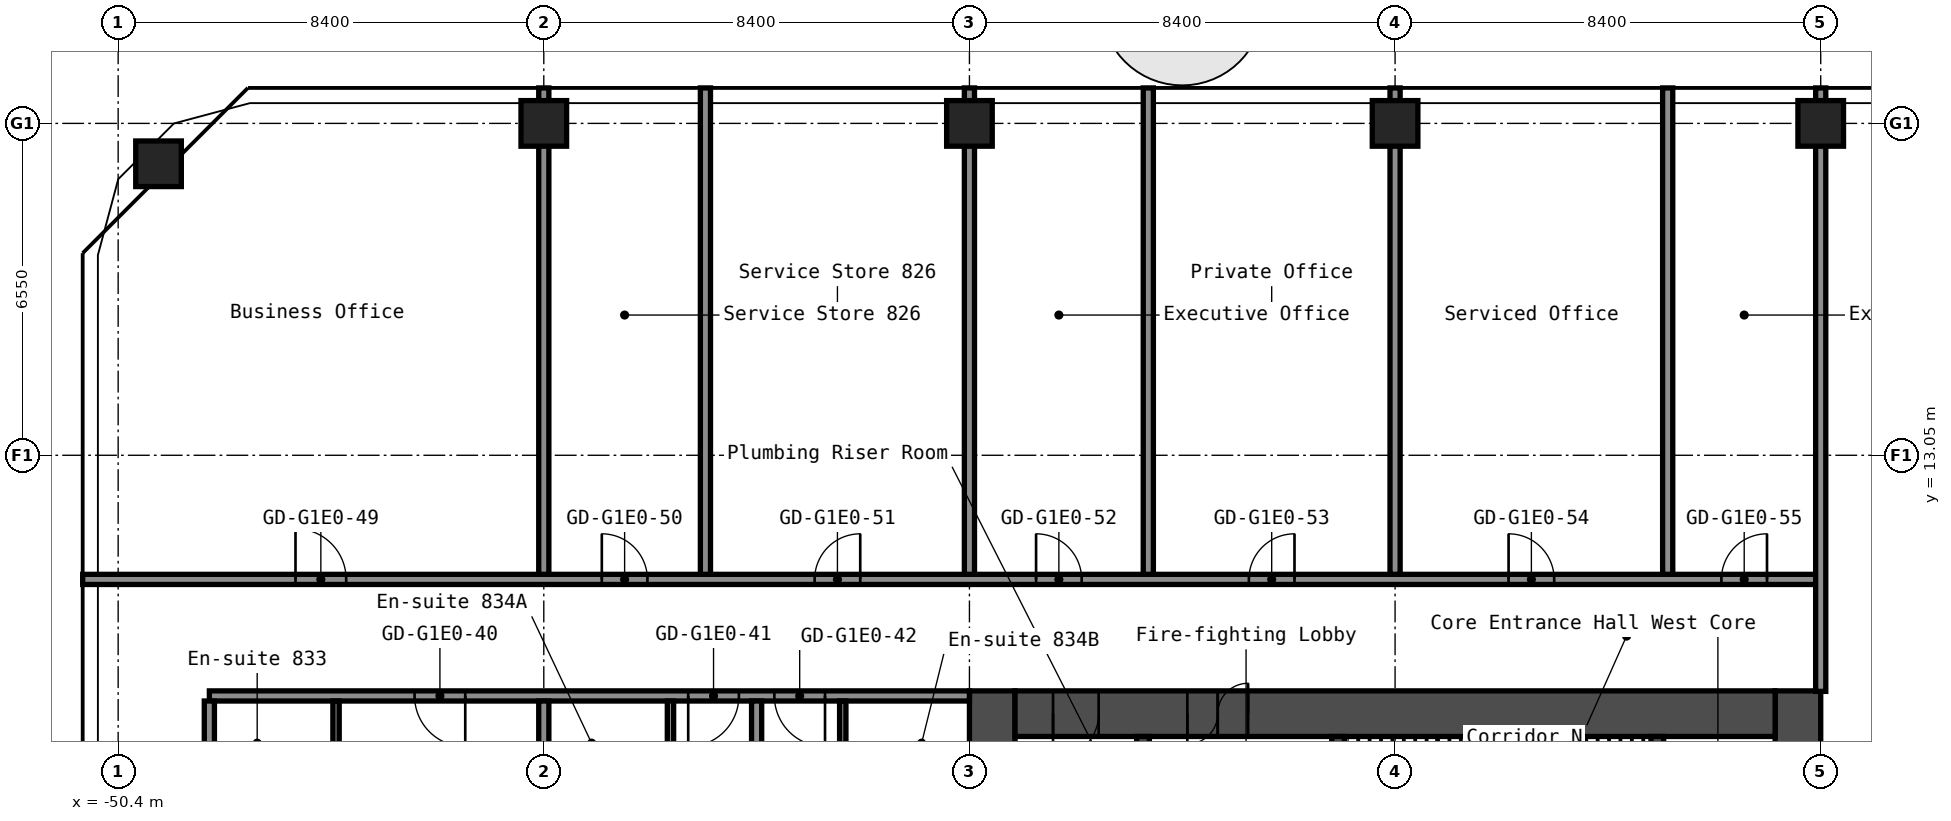
"""IFC4 building model, lengths in metres.
Left out: names, types, materials, properties, quantities, classifications, styles, units other than length and angle.
Written with IfcOpenShell. Run it as: python <this file> out.ifc"""

import sys

from ifc_helpers import new_model, si_unit, direction, frame, frame_2d, origin, origin_2d, place, context, subcontext, project, spatial, rectangle, hollow_rectangle, extrude, element, fill, save


model = new_model("IFC4")
c1 = context("Model", 3, precision=1e-05, world=origin(), true_north=direction((0.0, 1.0)))
c2 = subcontext(c1, "Body", "Model", "MODEL_VIEW")
j1 = project(units=[si_unit("LENGTHUNIT", "METRE"), si_unit("PLANEANGLEUNIT", "RADIAN")], contexts=[c1])
p1 = place(None, origin())
s1 = spatial("IfcSite", under=j1, at=p1, CompositionType="ELEMENT")
p2 = place(p1, origin())
s2 = spatial("IfcBuilding", under=s1, at=p2, CompositionType="ELEMENT")
p3 = place(p2, frame((0.0, 0.0, 32.6)))
s3 = spatial("IfcBuildingStorey", under=s2, at=p3, CompositionType="ELEMENT", Elevation=32.6)
for number, where, z_axis, x_axis in (
    (1, (-49.603, 18.803, 0.0), (0.0, 0.0, 1.0), (1.0, 0.0, 0.0)),
    (2, (-42.0, 19.6, 0.0), (0.0, 0.0, 1.0), (1.0, 0.0, 0.0)),
    (3, (-33.6, 19.6, 0.0), (0.0, 0.0, 1.0), (1.0, 0.0, 0.0)),
    (4, (-25.2, 19.6, 0.0), (0.0, 0.0, 1.0), (1.0, 0.0, 0.0)),
    (5, (-16.8, 19.6, 0.0), (0.0, 0.0, 1.0), (1.0, 0.0, 0.0)),
):
    element("IfcColumn", number, at=place(p3, frame(where, z_axis=z_axis, x_axis=x_axis)), inside=s3, PredefinedType="COLUMN", context=c2, shape_type="SweptSolid", body=[
        extrude(hollow_rectangle(XDim=0.9, YDim=0.9, WallThickness=0.036, at=origin_2d()), origin(), (0.0, 0.0, 1.0), 2.8),
    ])
p4 = place(p3, frame((-17.25, -8.4, 0.0), z_axis=(0.0, 0.0, 1.0), x_axis=(0.0, 1.0, 0.0)))
e6 = element("IfcWall", 6, at=p4, inside=s3, PredefinedType="SHEAR", context=c2, shape_type="SweptSolid", body=[
    extrude(rectangle(XDim=16.8, YDim=0.9, at=frame_2d((8.4, 0.0))), origin(), (0.0, 0.0, 1.0), 2.8),
])
p5 = place(p4, frame((12.75, 0.0, 0.0)))
e7 = element("IfcOpeningElement", 7, at=p5, cuts=e6, PredefinedType="OPENING", context=c2, shape_type="SweptSolid", body=[
    extrude(rectangle(XDim=1.2, YDim=2.1, at=frame_2d((0.6, 1.05))), frame((0.0, 0.46, 0.0), z_axis=(0.0, -1.0, 0.0), x_axis=(1.0, 0.0, 0.0)), (0.0, 0.0, 1.0), 0.92),
])
p6 = place(p4, frame((2.85, 0.0, 0.0)))
e8 = element("IfcOpeningElement", 8, at=p6, cuts=e6, PredefinedType="OPENING", context=c2, shape_type="SweptSolid", body=[
    extrude(rectangle(XDim=1.2, YDim=2.1, at=frame_2d((0.6, 1.05))), frame((0.0, 0.46, 0.0), z_axis=(0.0, -1.0, 0.0), x_axis=(1.0, 0.0, 0.0)), (0.0, 0.0, 1.0), 0.92),
])
p7 = place(p3, frame((-33.15, -8.4, 0.0), z_axis=(0.0, 0.0, 1.0), x_axis=(0.0, 1.0, 0.0)))
e9 = element("IfcWall", 9, at=p7, inside=s3, PredefinedType="SHEAR", context=c2, shape_type="SweptSolid", body=[
    extrude(rectangle(XDim=16.8, YDim=0.9, at=frame_2d((8.4, 0.0))), origin(), (0.0, 0.0, 1.0), 2.8),
])
p8 = place(p3, frame((-32.7, 7.95, 0.0), z_axis=(0.0, 0.0, 1.0), x_axis=(1.0, 0.0, 0.0)))
e10 = element("IfcWall", 10, at=p8, inside=s3, PredefinedType="SHEAR", context=c2, shape_type="SweptSolid", body=[
    extrude(rectangle(XDim=15.0, YDim=0.9, at=frame_2d((7.5, 0.0))), origin(), (0.0, 0.0, 1.0), 2.8),
])
p9 = place(p8, frame((3.4, 0.0, 0.0)))
e11 = element("IfcOpeningElement", 11, at=p9, cuts=e10, PredefinedType="OPENING", context=c2, shape_type="SweptSolid", body=[
    extrude(rectangle(XDim=1.2, YDim=2.1, at=frame_2d((0.6, 1.05))), frame((0.0, 0.46, 0.0), z_axis=(0.0, -1.0, 0.0), x_axis=(1.0, 0.0, 0.0)), (0.0, 0.0, 1.0), 0.92),
])
p10 = place(p8, frame((0.75, 0.0, 0.0)))
e12 = element("IfcOpeningElement", 12, at=p10, cuts=e10, PredefinedType="OPENING", context=c2, shape_type="SweptSolid", body=[
    extrude(rectangle(XDim=0.9, YDim=2.1, at=frame_2d((0.45, 1.05))), frame((0.0, 0.46, 0.0), z_axis=(0.0, -1.0, 0.0), x_axis=(1.0, 0.0, 0.0)), (0.0, 0.0, 1.0), 0.92),
])
p11 = place(p3, frame((-20.025, 1.2, 0.0), z_axis=(0.0, 0.0, 1.0), x_axis=(0.0, 1.0, 0.0)))
e13 = element("IfcWall", 13, at=p11, inside=s3, PredefinedType="SHEAR", context=c2, shape_type="SweptSolid", body=[
    extrude(rectangle(XDim=6.3, YDim=0.25, at=frame_2d((3.15, 0.0))), origin(), (0.0, 0.0, 1.0), 2.8),
])
p12 = place(p3, frame((-26.325, 3.75, 0.0), z_axis=(0.0, 0.0, 1.0), x_axis=(0.0, 1.0, 0.0)))
e14 = element("IfcWall", 14, at=p12, inside=s3, PredefinedType="SHEAR", context=c2, shape_type="SweptSolid", body=[
    extrude(rectangle(XDim=3.75, YDim=0.25, at=frame_2d((1.875, 0.0))), origin(), (0.0, 0.0, 1.0), 2.8),
])
p13 = place(p12, frame((1.25, 0.0, 0.0)))
e15 = element("IfcOpeningElement", 15, at=p13, cuts=e14, PredefinedType="OPENING", context=c2, shape_type="SweptSolid", body=[
    extrude(rectangle(XDim=1.2, YDim=2.1, at=frame_2d((0.6, 1.05))), frame((0.0, 0.135, 0.0), z_axis=(0.0, -1.0, 0.0), x_axis=(1.0, 0.0, 0.0)), (0.0, 0.0, 1.0), 0.27),
])
p14 = place(p3, frame((-30.175, 1.45, 0.0), z_axis=(0.0, 0.0, 1.0), x_axis=(0.0, 1.0, 0.0)))
e16 = element("IfcWall", 16, at=p14, inside=s3, PredefinedType="SHEAR", context=c2, shape_type="SweptSolid", body=[
    extrude(rectangle(XDim=6.05, YDim=0.25, at=frame_2d((3.025, 0.0))), origin(), (0.0, 0.0, 1.0), 2.8),
])
p15 = place(p14, frame((2.625, 0.0, 0.0)))
e17 = element("IfcOpeningElement", 17, at=p15, cuts=e16, PredefinedType="OPENING", context=c2, shape_type="SweptSolid", body=[
    extrude(rectangle(XDim=1.1, YDim=2.1, at=frame_2d((0.55, 1.05))), frame((0.0, 0.135, 0.0), z_axis=(0.0, -1.0, 0.0), x_axis=(1.0, 0.0, 0.0)), (0.0, 0.0, 1.0), 0.27),
])
p16 = place(p3, frame((-48.6, 8.3, 0.0), z_axis=(0.0, 0.0, 1.0), x_axis=(1.0, 0.0, 0.0)))
e18 = element("IfcWall", 18, at=p16, inside=s3, PredefinedType="PARTITIONING", context=c2, shape_type="SweptSolid", body=[
    extrude(rectangle(XDim=15.0, YDim=0.2, at=frame_2d((7.5, 0.0))), origin(), (0.0, 0.0, 1.0), 2.8),
])
p17 = place(p16, frame((4.05, 0.0, 0.0)))
e19 = element("IfcOpeningElement", 19, at=p17, cuts=e18, PredefinedType="OPENING", context=c2, shape_type="SweptSolid", body=[
    extrude(rectangle(XDim=1.0, YDim=2.1, at=frame_2d((0.5, 1.05))), frame((0.0, 0.11, 0.0), z_axis=(0.0, -1.0, 0.0), x_axis=(1.0, 0.0, 0.0)), (0.0, 0.0, 1.0), 0.22),
])
p18 = place(p16, frame((9.45, 0.0, 0.0)))
e20 = element("IfcOpeningElement", 20, at=p18, cuts=e18, PredefinedType="OPENING", context=c2, shape_type="SweptSolid", body=[
    extrude(rectangle(XDim=1.0, YDim=2.1, at=frame_2d((0.5, 1.05))), frame((0.0, 0.11, 0.0), z_axis=(0.0, -1.0, 0.0), x_axis=(1.0, 0.0, 0.0)), (0.0, 0.0, 1.0), 0.22),
])
p19 = place(p16, frame((11.15, 0.0, 0.0)))
e21 = element("IfcOpeningElement", 21, at=p19, cuts=e18, PredefinedType="OPENING", context=c2, shape_type="SweptSolid", body=[
    extrude(rectangle(XDim=1.0, YDim=2.1, at=frame_2d((0.5, 1.05))), frame((0.0, 0.11, 0.0), z_axis=(0.0, -1.0, 0.0), x_axis=(1.0, 0.0, 0.0)), (0.0, 0.0, 1.0), 0.22),
])
p20 = place(p3, frame((-51.1, 10.6, 0.0), z_axis=(0.0, 0.0, 1.0), x_axis=(1.0, 0.0, 0.0)))
e22 = element("IfcWall", 22, at=p20, inside=s3, PredefinedType="PARTITIONING", context=c2, shape_type="SweptSolid", body=[
    extrude(rectangle(XDim=34.3, YDim=0.2, at=frame_2d((17.15, 0.0))), origin(), (0.0, 0.0, 1.0), 2.8),
])
p21 = place(p20, frame((4.2, 0.0, 0.0)))
e23 = element("IfcOpeningElement", 23, at=p21, cuts=e22, PredefinedType="OPENING", context=c2, shape_type="SweptSolid", body=[
    extrude(rectangle(XDim=1.0, YDim=2.1, at=frame_2d((0.5, 1.05))), frame((0.0, 0.11, 0.0), z_axis=(0.0, -1.0, 0.0), x_axis=(1.0, 0.0, 0.0)), (0.0, 0.0, 1.0), 0.22),
])
p22 = place(p20, frame((10.245, 0.0, 0.0)))
e24 = element("IfcOpeningElement", 24, at=p22, cuts=e22, PredefinedType="OPENING", context=c2, shape_type="SweptSolid", body=[
    extrude(rectangle(XDim=0.9, YDim=2.1, at=frame_2d((0.45, 1.05))), frame((0.0, 0.11, 0.0), z_axis=(0.0, -1.0, 0.0), x_axis=(1.0, 0.0, 0.0)), (0.0, 0.0, 1.0), 0.22),
])
p23 = place(p20, frame((14.445, 0.0, 0.0)))
e25 = element("IfcOpeningElement", 25, at=p23, cuts=e22, PredefinedType="OPENING", context=c2, shape_type="SweptSolid", body=[
    extrude(rectangle(XDim=0.9, YDim=2.1, at=frame_2d((0.45, 1.05))), frame((0.0, 0.11, 0.0), z_axis=(0.0, -1.0, 0.0), x_axis=(1.0, 0.0, 0.0)), (0.0, 0.0, 1.0), 0.22),
])
p24 = place(p20, frame((18.815, 0.0, 0.0)))
e26 = element("IfcOpeningElement", 26, at=p24, cuts=e22, PredefinedType="OPENING", context=c2, shape_type="SweptSolid", body=[
    extrude(rectangle(XDim=0.9, YDim=2.1, at=frame_2d((0.45, 1.05))), frame((0.0, 0.11, 0.0), z_axis=(0.0, -1.0, 0.0), x_axis=(1.0, 0.0, 0.0)), (0.0, 0.0, 1.0), 0.22),
])
p25 = place(p20, frame((23.015, 0.0, 0.0)))
e27 = element("IfcOpeningElement", 27, at=p25, cuts=e22, PredefinedType="OPENING", context=c2, shape_type="SweptSolid", body=[
    extrude(rectangle(XDim=0.9, YDim=2.1, at=frame_2d((0.45, 1.05))), frame((0.0, 0.11, 0.0), z_axis=(0.0, -1.0, 0.0), x_axis=(1.0, 0.0, 0.0)), (0.0, 0.0, 1.0), 0.22),
])
p26 = place(p20, frame((28.14, 0.0, 0.0)))
e28 = element("IfcOpeningElement", 28, at=p26, cuts=e22, PredefinedType="OPENING", context=c2, shape_type="SweptSolid", body=[
    extrude(rectangle(XDim=0.9, YDim=2.1, at=frame_2d((0.45, 1.05))), frame((0.0, 0.11, 0.0), z_axis=(0.0, -1.0, 0.0), x_axis=(1.0, 0.0, 0.0)), (0.0, 0.0, 1.0), 0.22),
])
p27 = place(p20, frame((32.34, 0.0, 0.0)))
e29 = element("IfcOpeningElement", 29, at=p27, cuts=e22, PredefinedType="OPENING", context=c2, shape_type="SweptSolid", body=[
    extrude(rectangle(XDim=0.9, YDim=2.1, at=frame_2d((0.45, 1.05))), frame((0.0, 0.11, 0.0), z_axis=(0.0, -1.0, 0.0), x_axis=(1.0, 0.0, 0.0)), (0.0, 0.0, 1.0), 0.22),
])
p28 = place(p3, frame((-48.6, -8.2, 0.0), z_axis=(0.0, 0.0, 1.0), x_axis=(0.0, 1.0, 0.0)))
e30 = element("IfcWall", 30, at=p28, inside=s3, PredefinedType="PARTITIONING", context=c2, shape_type="SweptSolid", body=[
    extrude(rectangle(XDim=16.4, YDim=0.2, at=frame_2d((8.2, 0.0))), origin(), (0.0, 0.0, 1.0), 2.8),
])
p29 = place(p3, frame((-46.1, 5.3, 0.0), z_axis=(0.0, 0.0, 1.0), x_axis=(0.0, 1.0, 0.0)))
e31 = element("IfcWall", 31, at=p29, inside=s3, PredefinedType="PARTITIONING", context=c2, shape_type="SweptSolid", body=[
    extrude(rectangle(XDim=2.9, YDim=0.125, at=frame_2d((1.45, 0.0))), origin(), (0.0, 0.0, 1.0), 2.8),
])
p30 = place(p29, frame((0.6, 0.0, 0.0)))
e32 = element("IfcOpeningElement", 32, at=p30, cuts=e31, PredefinedType="OPENING", context=c2, shape_type="SweptSolid", body=[
    extrude(rectangle(XDim=0.8, YDim=2.1, at=frame_2d((0.4, 1.05))), frame((0.0, 0.073, 0.0), z_axis=(0.0, -1.0, 0.0), x_axis=(1.0, 0.0, 0.0)), (0.0, 0.0, 1.0), 0.145),
])
p31 = place(p3, frame((-42.0, -8.2, 0.0), z_axis=(0.0, 0.0, 1.0), x_axis=(0.0, 1.0, 0.0)))
e33 = element("IfcWall", 33, at=p31, inside=s3, PredefinedType="PARTITIONING", context=c2, shape_type="SweptSolid", body=[
    extrude(rectangle(XDim=16.4, YDim=0.2, at=frame_2d((8.2, 0.0))), origin(), (0.0, 0.0, 1.0), 2.8),
])
p32 = place(p3, frame((-42.0, 10.7, 0.0), z_axis=(0.0, 0.0, 1.0), x_axis=(0.0, 1.0, 0.0)))
e34 = element("IfcWall", 34, at=p32, inside=s3, PredefinedType="PARTITIONING", context=c2, shape_type="SweptSolid", body=[
    extrude(rectangle(XDim=9.6, YDim=0.2, at=frame_2d((4.8, 0.0))), origin(), (0.0, 0.0, 1.0), 2.8),
])
p33 = place(p3, frame((-39.5, 5.3, 0.0), z_axis=(0.0, 0.0, 1.0), x_axis=(0.0, 1.0, 0.0)))
e35 = element("IfcWall", 35, at=p33, inside=s3, PredefinedType="PARTITIONING", context=c2, shape_type="SweptSolid", body=[
    extrude(rectangle(XDim=2.9, YDim=0.125, at=frame_2d((1.45, 0.0))), origin(), (0.0, 0.0, 1.0), 2.8),
])
p34 = place(p33, frame((0.6, 0.0, 0.0)))
e36 = element("IfcOpeningElement", 36, at=p34, cuts=e35, PredefinedType="OPENING", context=c2, shape_type="SweptSolid", body=[
    extrude(rectangle(XDim=0.8, YDim=2.1, at=frame_2d((0.4, 1.05))), frame((0.0, 0.073, 0.0), z_axis=(0.0, -1.0, 0.0), x_axis=(1.0, 0.0, 0.0)), (0.0, 0.0, 1.0), 0.145),
])
p35 = place(p3, frame((-38.81, 10.7, 0.0), z_axis=(0.0, 0.0, 1.0), x_axis=(0.0, 1.0, 0.0)))
e37 = element("IfcWall", 37, at=p35, inside=s3, PredefinedType="PARTITIONING", context=c2, shape_type="SweptSolid", body=[
    extrude(rectangle(XDim=9.6, YDim=0.2, at=frame_2d((4.8, 0.0))), origin(), (0.0, 0.0, 1.0), 2.8),
])
p36 = place(p3, frame((-37.8, 0.0, 0.0), z_axis=(0.0, 0.0, 1.0), x_axis=(0.0, 1.0, 0.0)))
e38 = element("IfcWall", 38, at=p36, inside=s3, PredefinedType="PARTITIONING", context=c2, shape_type="SweptSolid", body=[
    extrude(rectangle(XDim=8.2, YDim=0.2, at=frame_2d((4.1, 0.0))), origin(), (0.0, 0.0, 1.0), 2.8),
])
p37 = place(p3, frame((-36.1, 5.3, 0.0), z_axis=(0.0, 0.0, 1.0), x_axis=(0.0, 1.0, 0.0)))
e39 = element("IfcWall", 39, at=p37, inside=s3, PredefinedType="PARTITIONING", context=c2, shape_type="SweptSolid", body=[
    extrude(rectangle(XDim=2.9, YDim=0.125, at=frame_2d((1.45, 0.0))), origin(), (0.0, 0.0, 1.0), 2.8),
])
p38 = place(p37, frame((0.6, 0.0, 0.0)))
e40 = element("IfcOpeningElement", 40, at=p38, cuts=e39, PredefinedType="OPENING", context=c2, shape_type="SweptSolid", body=[
    extrude(rectangle(XDim=0.8, YDim=2.1, at=frame_2d((0.4, 1.05))), frame((0.0, 0.073, 0.0), z_axis=(0.0, -1.0, 0.0), x_axis=(1.0, 0.0, 0.0)), (0.0, 0.0, 1.0), 0.145),
])
for number, where, z_axis, x_axis in (
    (41, (-33.6, 10.7, 0.0), (0.0, 0.0, 1.0), (0.0, 1.0, 0.0)),
    (42, (-30.07, 10.7, 0.0), (0.0, 0.0, 1.0), (0.0, 1.0, 0.0)),
    (43, (-25.2, 10.7, 0.0), (0.0, 0.0, 1.0), (0.0, 1.0, 0.0)),
    (44, (-19.82, 10.7, 0.0), (0.0, 0.0, 1.0), (0.0, 1.0, 0.0)),
):
    element("IfcWall", number, at=place(p3, frame(where, z_axis=z_axis, x_axis=x_axis)), inside=s3, PredefinedType="PARTITIONING", context=c2, shape_type="SweptSolid", body=[
        extrude(rectangle(XDim=9.6, YDim=0.2, at=frame_2d((4.8, 0.0))), origin(), (0.0, 0.0, 1.0), 2.8),
    ])
p39 = place(p3, frame((-16.8, 8.39, 0.0), z_axis=(0.0, 0.0, 1.0), x_axis=(0.0, 1.0, 0.0)))
e45 = element("IfcWall", 45, at=p39, inside=s3, PredefinedType="PARTITIONING", context=c2, shape_type="SweptSolid", body=[
    extrude(rectangle(XDim=11.91, YDim=0.2, at=frame_2d((5.955, 0.0))), origin(), (0.0, 0.0, 1.0), 2.8),
])
p40 = place(p9, origin())
e46 = element("IfcDoor", 46, at=p40, inside=s3, OperationType="DOUBLE_DOOR_SINGLE_SWING", PredefinedType="DOOR", context=c2, shape_type="SweptSolid", body=[
    extrude(rectangle(XDim=1.2, YDim=2.1, at=frame_2d((0.6, 1.05))), frame((0.0, 0.025, 0.0), z_axis=(0.0, -1.0, 0.0), x_axis=(1.0, 0.0, 0.0)), (0.0, 0.0, 1.0), 0.05),
])
fill(e11, e46)
p41 = place(p10, origin())
e47 = element("IfcDoor", 47, at=p41, inside=s3, OperationType="SINGLE_SWING_LEFT", PredefinedType="DOOR", context=c2, shape_type="SweptSolid", body=[
    extrude(rectangle(XDim=0.9, YDim=2.1, at=frame_2d((0.45, 1.05))), frame((0.0, 0.025, 0.0), z_axis=(0.0, -1.0, 0.0), x_axis=(1.0, 0.0, 0.0)), (0.0, 0.0, 1.0), 0.05),
])
fill(e12, e47)
p42 = place(p17, origin())
e48 = element("IfcDoor", 48, at=p42, inside=s3, OperationType="SINGLE_SWING_RIGHT", PredefinedType="DOOR", context=c2, shape_type="SweptSolid", body=[
    extrude(rectangle(XDim=1.0, YDim=2.1, at=frame_2d((0.5, 1.05))), frame((0.0, 0.025, 0.0), z_axis=(0.0, -1.0, 0.0), x_axis=(1.0, 0.0, 0.0)), (0.0, 0.0, 1.0), 0.05),
])
fill(e19, e48)
p43 = place(p18, origin())
e49 = element("IfcDoor", 49, at=p43, inside=s3, OperationType="SINGLE_SWING_LEFT", PredefinedType="DOOR", context=c2, shape_type="SweptSolid", body=[
    extrude(rectangle(XDim=1.0, YDim=2.1, at=frame_2d((0.5, 1.05))), frame((0.0, 0.025, 0.0), z_axis=(0.0, -1.0, 0.0), x_axis=(1.0, 0.0, 0.0)), (0.0, 0.0, 1.0), 0.05),
])
fill(e20, e49)
p44 = place(p19, origin())
e50 = element("IfcDoor", 50, at=p44, inside=s3, OperationType="SINGLE_SWING_RIGHT", PredefinedType="DOOR", context=c2, shape_type="SweptSolid", body=[
    extrude(rectangle(XDim=1.0, YDim=2.1, at=frame_2d((0.5, 1.05))), frame((0.0, 0.025, 0.0), z_axis=(0.0, -1.0, 0.0), x_axis=(1.0, 0.0, 0.0)), (0.0, 0.0, 1.0), 0.05),
])
fill(e21, e50)
p45 = place(p21, origin())
e51 = element("IfcDoor", 51, at=p45, inside=s3, OperationType="SINGLE_SWING_RIGHT", PredefinedType="DOOR", context=c2, shape_type="SweptSolid", body=[
    extrude(rectangle(XDim=1.0, YDim=2.1, at=frame_2d((0.5, 1.05))), frame((0.0, 0.025, 0.0), z_axis=(0.0, -1.0, 0.0), x_axis=(1.0, 0.0, 0.0)), (0.0, 0.0, 1.0), 0.05),
])
fill(e23, e51)
p46 = place(p22, origin())
e52 = element("IfcDoor", 52, at=p46, inside=s3, OperationType="SINGLE_SWING_RIGHT", PredefinedType="DOOR", context=c2, shape_type="SweptSolid", body=[
    extrude(rectangle(XDim=0.9, YDim=2.1, at=frame_2d((0.45, 1.05))), frame((0.0, 0.025, 0.0), z_axis=(0.0, -1.0, 0.0), x_axis=(1.0, 0.0, 0.0)), (0.0, 0.0, 1.0), 0.05),
])
fill(e24, e52)
p47 = place(p23, origin())
e53 = element("IfcDoor", 53, at=p47, inside=s3, OperationType="SINGLE_SWING_LEFT", PredefinedType="DOOR", context=c2, shape_type="SweptSolid", body=[
    extrude(rectangle(XDim=0.9, YDim=2.1, at=frame_2d((0.45, 1.05))), frame((0.0, 0.025, 0.0), z_axis=(0.0, -1.0, 0.0), x_axis=(1.0, 0.0, 0.0)), (0.0, 0.0, 1.0), 0.05),
])
fill(e25, e53)
p48 = place(p24, origin())
e54 = element("IfcDoor", 54, at=p48, inside=s3, OperationType="SINGLE_SWING_RIGHT", PredefinedType="DOOR", context=c2, shape_type="SweptSolid", body=[
    extrude(rectangle(XDim=0.9, YDim=2.1, at=frame_2d((0.45, 1.05))), frame((0.0, 0.025, 0.0), z_axis=(0.0, -1.0, 0.0), x_axis=(1.0, 0.0, 0.0)), (0.0, 0.0, 1.0), 0.05),
])
fill(e26, e54)
p49 = place(p25, origin())
e55 = element("IfcDoor", 55, at=p49, inside=s3, OperationType="SINGLE_SWING_LEFT", PredefinedType="DOOR", context=c2, shape_type="SweptSolid", body=[
    extrude(rectangle(XDim=0.9, YDim=2.1, at=frame_2d((0.45, 1.05))), frame((0.0, 0.025, 0.0), z_axis=(0.0, -1.0, 0.0), x_axis=(1.0, 0.0, 0.0)), (0.0, 0.0, 1.0), 0.05),
])
fill(e27, e55)
p50 = place(p26, origin())
e56 = element("IfcDoor", 56, at=p50, inside=s3, OperationType="SINGLE_SWING_RIGHT", PredefinedType="DOOR", context=c2, shape_type="SweptSolid", body=[
    extrude(rectangle(XDim=0.9, YDim=2.1, at=frame_2d((0.45, 1.05))), frame((0.0, 0.025, 0.0), z_axis=(0.0, -1.0, 0.0), x_axis=(1.0, 0.0, 0.0)), (0.0, 0.0, 1.0), 0.05),
])
fill(e28, e56)
p51 = place(p27, origin())
e57 = element("IfcDoor", 57, at=p51, inside=s3, OperationType="SINGLE_SWING_LEFT", PredefinedType="DOOR", context=c2, shape_type="SweptSolid", body=[
    extrude(rectangle(XDim=0.9, YDim=2.1, at=frame_2d((0.45, 1.05))), frame((0.0, 0.025, 0.0), z_axis=(0.0, -1.0, 0.0), x_axis=(1.0, 0.0, 0.0)), (0.0, 0.0, 1.0), 0.05),
])
fill(e29, e57)
save(model, sys.argv[1])
